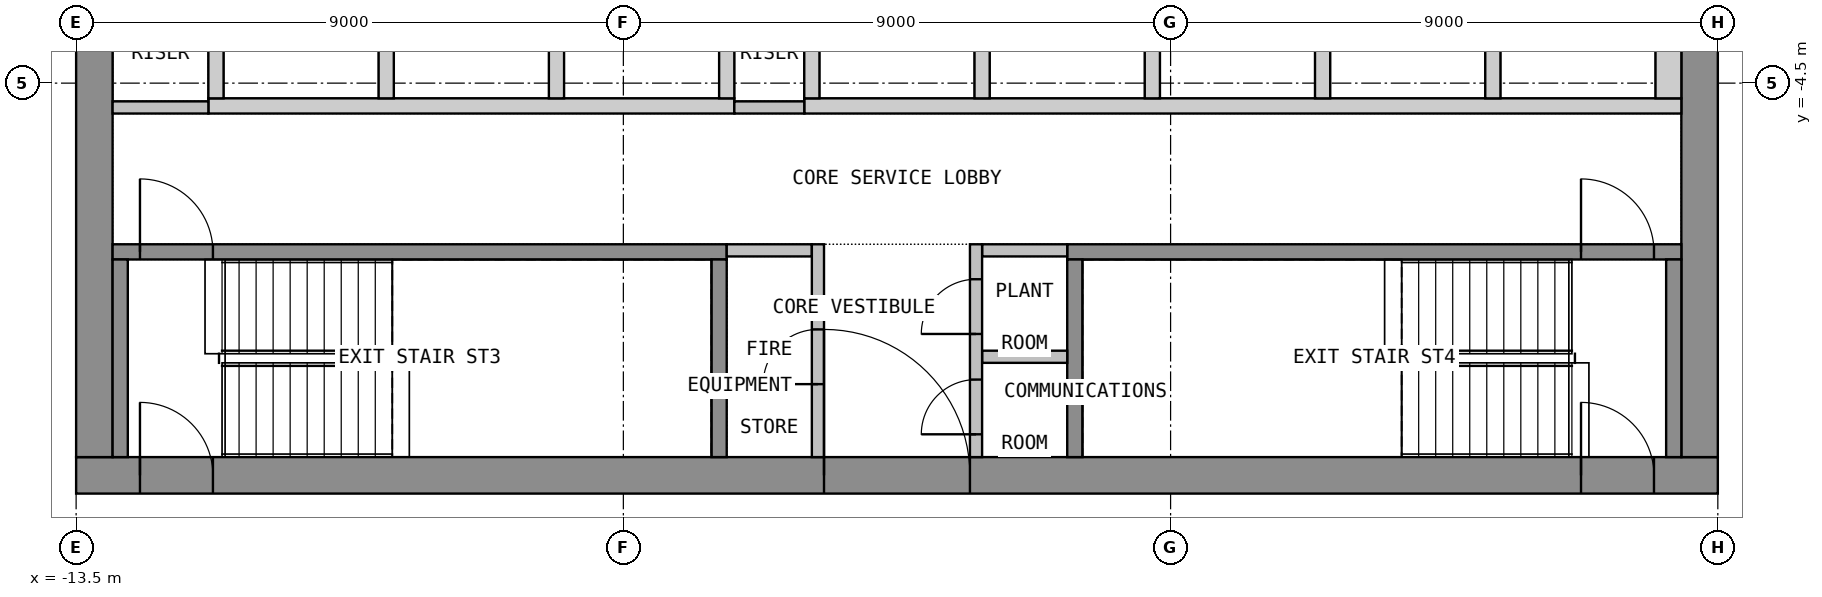
"""IFC4 building model, lengths in metres.
Left out: names, types, materials, properties, quantities, classifications, styles, units other than length and angle.
Written with IfcOpenShell. Run it as: python <this file> out.ifc"""

import sys

from ifc_helpers import new_model, si_unit, direction, frame, frame_2d, origin, place, context, subcontext, project, spatial, polyline, rectangle, outline, extrude, element, fill, save


model = new_model("IFC4")
c1 = context("Model", 3, precision=1e-05, world=origin(), true_north=direction((0.0, 1.0)))
c2 = subcontext(c1, "Body", "Model", "MODEL_VIEW")
j1 = project(units=[si_unit("LENGTHUNIT", "METRE"), si_unit("PLANEANGLEUNIT", "RADIAN")], contexts=[c1])
p1 = place(None, origin())
s1 = spatial("IfcSite", under=j1, at=p1, CompositionType="ELEMENT")
p2 = place(p1, origin())
s2 = spatial("IfcBuilding", under=s1, at=p2, CompositionType="ELEMENT")
p3 = place(p2, frame((0.0, 0.0, 235.2)))
s3 = spatial("IfcBuildingStorey", under=s2, at=p3, CompositionType="ELEMENT", Elevation=235.2)
p4 = place(p3, frame((-13.5, -10.95, 0.0), z_axis=(0.0, 0.0, 1.0), x_axis=(1.0, 0.0, 0.0)))
e1 = element("IfcWall", 1, at=p4, inside=s3, PredefinedType="SHEAR", context=c2, shape_type="SweptSolid", body=[
    extrude(rectangle(XDim=27.0, YDim=0.6, at=frame_2d((13.5, 0.0))), origin(), (0.0, 0.0, 1.0), 3.575),
])
p5 = place(p4, frame((12.3, 0.0, 0.0)))
e2 = element("IfcOpeningElement", 2, at=p5, cuts=e1, PredefinedType="OPENING", context=c2, shape_type="SweptSolid", body=[
    extrude(rectangle(XDim=2.4, YDim=2.1, at=frame_2d((1.2, 1.05))), frame((0.0, 0.31, 0.0), z_axis=(0.0, -1.0, 0.0), x_axis=(1.0, 0.0, 0.0)), (0.0, 0.0, 1.0), 0.62),
])
p6 = place(p4, frame((1.05, 0.0, 0.0)))
e3 = element("IfcOpeningElement", 3, at=p6, cuts=e1, PredefinedType="OPENING", context=c2, shape_type="SweptSolid", body=[
    extrude(rectangle(XDim=1.2, YDim=2.1, at=frame_2d((0.6, 1.05))), frame((0.0, 0.31, 0.0), z_axis=(0.0, -1.0, 0.0), x_axis=(1.0, 0.0, 0.0)), (0.0, 0.0, 1.0), 0.62),
])
p7 = place(p4, frame((24.75, 0.0, 0.0)))
e4 = element("IfcOpeningElement", 4, at=p7, cuts=e1, PredefinedType="OPENING", context=c2, shape_type="SweptSolid", body=[
    extrude(rectangle(XDim=1.2, YDim=2.1, at=frame_2d((0.6, 1.05))), frame((0.0, 0.31, 0.0), z_axis=(0.0, -1.0, 0.0), x_axis=(1.0, 0.0, 0.0)), (0.0, 0.0, 1.0), 0.62),
])
p8 = place(p3, frame((-13.2, -10.65, 0.0), z_axis=(0.0, 0.0, 1.0), x_axis=(0.0, 1.0, 0.0)))
e5 = element("IfcWall", 5, at=p8, inside=s3, PredefinedType="SHEAR", context=c2, shape_type="SweptSolid", body=[
    extrude(rectangle(XDim=21.3, YDim=0.6, at=frame_2d((10.65, 0.0))), origin(), (0.0, 0.0, 1.0), 3.575),
])
p9 = place(p8, frame((9.45, 0.0, 0.0)))
e6 = element("IfcOpeningElement", 6, at=p9, cuts=e5, PredefinedType="OPENING", context=c2, shape_type="SweptSolid", body=[
    extrude(rectangle(XDim=2.4, YDim=2.1, at=frame_2d((1.2, 1.05))), frame((0.0, 0.31, 0.0), z_axis=(0.0, -1.0, 0.0), x_axis=(1.0, 0.0, 0.0)), (0.0, 0.0, 1.0), 0.62),
])
p10 = place(p3, frame((13.2, -10.65, 0.0), z_axis=(0.0, 0.0, 1.0), x_axis=(0.0, 1.0, 0.0)))
e7 = element("IfcWall", 7, at=p10, inside=s3, PredefinedType="SHEAR", context=c2, shape_type="SweptSolid", body=[
    extrude(rectangle(XDim=21.3, YDim=0.6, at=frame_2d((10.65, 0.0))), origin(), (0.0, 0.0, 1.0), 3.575),
])
p11 = place(p10, frame((9.45, 0.0, 0.0)))
e8 = element("IfcOpeningElement", 8, at=p11, cuts=e7, PredefinedType="OPENING", context=c2, shape_type="SweptSolid", body=[
    extrude(rectangle(XDim=2.4, YDim=2.1, at=frame_2d((1.2, 1.05))), frame((0.0, 0.31, 0.0), z_axis=(0.0, -1.0, 0.0), x_axis=(1.0, 0.0, 0.0)), (0.0, 0.0, 1.0), 0.62),
])
p12 = place(p3, origin())
e9 = element("IfcWall", 9, at=p12, inside=s3, PredefinedType="SHEAR", context=c2, shape_type="SweptSolid", body=[
    extrude(outline(polyline([(-11.325, -5.0), (-2.675, -5.0), (-2.675, -4.75), (-11.325, -4.75), (-11.325, -5.0)])), origin(), (0.0, 0.0, 1.0), 3.575),
])
p13 = place(p3, origin())
e10 = element("IfcWall", 10, at=p13, inside=s3, PredefinedType="SHEAR", context=c2, shape_type="SweptSolid", body=[
    extrude(outline(polyline([(-1.525, -5.0), (12.9, -5.0), (12.9, -4.75), (-1.525, -4.75), (-1.525, -5.0)])), origin(), (0.0, 0.0, 1.0), 3.575),
])
p14 = place(p3, origin())
e11 = element("IfcWall", 11, at=p14, inside=s3, PredefinedType="SHEAR", context=c2, shape_type="SweptSolid", body=[
    extrude(outline(polyline([(-11.325, -4.75), (-11.075, -4.75), (-11.075, -2.05), (-11.325, -2.05), (-11.325, -4.75)])), origin(), (0.0, 0.0, 1.0), 3.575),
])
p15 = place(p3, origin())
e12 = element("IfcWall", 12, at=p15, inside=s3, PredefinedType="SHEAR", context=c2, shape_type="SweptSolid", body=[
    extrude(outline(polyline([(-8.525, -4.75), (-8.275, -4.75), (-8.275, -2.05), (-8.525, -2.05), (-8.525, -4.75)])), origin(), (0.0, 0.0, 1.0), 3.575),
])
p16 = place(p3, origin())
e13 = element("IfcWall", 13, at=p16, inside=s3, PredefinedType="SHEAR", context=c2, shape_type="SweptSolid", body=[
    extrude(outline(polyline([(-5.725, -4.75), (-5.475, -4.75), (-5.475, -2.05), (-5.725, -2.05), (-5.725, -4.75)])), origin(), (0.0, 0.0, 1.0), 3.575),
])
p17 = place(p3, origin())
e14 = element("IfcWall", 14, at=p17, inside=s3, PredefinedType="SHEAR", context=c2, shape_type="SweptSolid", body=[
    extrude(outline(polyline([(-2.925, -4.75), (-2.675, -4.75), (-2.675, -2.05), (-2.925, -2.05), (-2.925, -4.75)])), origin(), (0.0, 0.0, 1.0), 3.575),
])
p18 = place(p3, origin())
e15 = element("IfcWall", 15, at=p18, inside=s3, PredefinedType="SHEAR", context=c2, shape_type="SweptSolid", body=[
    extrude(outline(polyline([(-1.525, -4.75), (-1.275, -4.75), (-1.275, -2.05), (-1.525, -2.05), (-1.525, -4.75)])), origin(), (0.0, 0.0, 1.0), 3.575),
])
p19 = place(p3, origin())
e16 = element("IfcWall", 16, at=p19, inside=s3, PredefinedType="SHEAR", context=c2, shape_type="SweptSolid", body=[
    extrude(outline(polyline([(1.275, -4.75), (1.525, -4.75), (1.525, -2.05), (1.275, -2.05), (1.275, -4.75)])), origin(), (0.0, 0.0, 1.0), 3.575),
])
p20 = place(p3, origin())
e17 = element("IfcWall", 17, at=p20, inside=s3, PredefinedType="SHEAR", context=c2, shape_type="SweptSolid", body=[
    extrude(outline(polyline([(4.075, -4.75), (4.325, -4.75), (4.325, -2.05), (4.075, -2.05), (4.075, -4.75)])), origin(), (0.0, 0.0, 1.0), 3.575),
])
p21 = place(p3, origin())
e18 = element("IfcWall", 18, at=p21, inside=s3, PredefinedType="SHEAR", context=c2, shape_type="SweptSolid", body=[
    extrude(outline(polyline([(6.875, -4.75), (7.125, -4.75), (7.125, -2.05), (6.875, -2.05), (6.875, -4.75)])), origin(), (0.0, 0.0, 1.0), 3.575),
])
p22 = place(p3, origin())
e19 = element("IfcWall", 19, at=p22, inside=s3, PredefinedType="SHEAR", context=c2, shape_type="SweptSolid", body=[
    extrude(outline(polyline([(9.675, -4.75), (9.925, -4.75), (9.925, -2.05), (9.675, -2.05), (9.675, -4.75)])), origin(), (0.0, 0.0, 1.0), 3.575),
])
p23 = place(p3, origin())
e20 = element("IfcWall", 20, at=p23, inside=s3, PredefinedType="SHEAR", context=c2, shape_type="SweptSolid", body=[
    extrude(outline(polyline([(12.475, -4.75), (12.9, -4.75), (12.9, -2.05), (12.475, -2.05), (12.475, -4.75)])), origin(), (0.0, 0.0, 1.0), 3.575),
])
p24 = place(p3, frame((-12.9, -7.275, 0.0), z_axis=(0.0, 0.0, 1.0), x_axis=(1.0, 0.0, 0.0)))
e21 = element("IfcWall", 21, at=p24, inside=s3, PredefinedType="SHEAR", context=c2, shape_type="SweptSolid", body=[
    extrude(rectangle(XDim=10.1, YDim=0.25, at=frame_2d((5.05, 0.0))), origin(), (0.0, 0.0, 1.0), 3.575),
])
p25 = place(p24, frame((0.45, 0.0, 0.0)))
e22 = element("IfcOpeningElement", 22, at=p25, cuts=e21, PredefinedType="OPENING", context=c2, shape_type="SweptSolid", body=[
    extrude(rectangle(XDim=1.2, YDim=2.1, at=frame_2d((0.6, 1.05))), frame((0.0, 0.135, 0.0), z_axis=(0.0, -1.0, 0.0), x_axis=(1.0, 0.0, 0.0)), (0.0, 0.0, 1.0), 0.27),
])
for number, where, z_axis, x_axis in (
    (23, (-12.775, -10.65, 0.0), (0.0, 0.0, 1.0), (0.0, 1.0, 0.0)),
    (24, (-2.925, -10.65, 0.0), (0.0, 0.0, 1.0), (0.0, 1.0, 0.0)),
):
    element("IfcWall", number, at=place(p3, frame(where, z_axis=z_axis, x_axis=x_axis)), inside=s3, PredefinedType="SHEAR", context=c2, shape_type="SweptSolid", body=[
        extrude(rectangle(XDim=3.25, YDim=0.25, at=frame_2d((1.625, 0.0))), origin(), (0.0, 0.0, 1.0), 3.575),
    ])
p26 = place(p3, frame((2.8, -7.275, 0.0), z_axis=(0.0, 0.0, 1.0), x_axis=(1.0, 0.0, 0.0)))
e25 = element("IfcWall", 25, at=p26, inside=s3, PredefinedType="SHEAR", context=c2, shape_type="SweptSolid", body=[
    extrude(rectangle(XDim=10.1, YDim=0.25, at=frame_2d((5.05, 0.0))), origin(), (0.0, 0.0, 1.0), 3.575),
])
p27 = place(p26, frame((8.45, 0.0, 0.0)))
e26 = element("IfcOpeningElement", 26, at=p27, cuts=e25, PredefinedType="OPENING", context=c2, shape_type="SweptSolid", body=[
    extrude(rectangle(XDim=1.2, YDim=2.1, at=frame_2d((0.6, 1.05))), frame((0.0, 0.135, 0.0), z_axis=(0.0, -1.0, 0.0), x_axis=(1.0, 0.0, 0.0)), (0.0, 0.0, 1.0), 0.27),
])
for number, where, z_axis, x_axis in (
    (27, (2.925, -10.65, 0.0), (0.0, 0.0, 1.0), (0.0, 1.0, 0.0)),
    (28, (12.775, -10.65, 0.0), (0.0, 0.0, 1.0), (0.0, 1.0, 0.0)),
):
    element("IfcWall", number, at=place(p3, frame(where, z_axis=z_axis, x_axis=x_axis)), inside=s3, PredefinedType="SHEAR", context=c2, shape_type="SweptSolid", body=[
        extrude(rectangle(XDim=3.25, YDim=0.25, at=frame_2d((1.625, 0.0))), origin(), (0.0, 0.0, 1.0), 3.575),
    ])
for number, where, z_axis, x_axis in (
    (29, (-2.8, -7.25, 0.0), (0.0, 0.0, 1.0), (1.0, 0.0, 0.0)),
    (30, (1.4, -7.25, 0.0), (0.0, 0.0, 1.0), (1.0, 0.0, 0.0)),
    (31, (1.4, -9.0, 0.0), (0.0, 0.0, 1.0), (1.0, 0.0, 0.0)),
):
    element("IfcWall", number, at=place(p3, frame(where, z_axis=z_axis, x_axis=x_axis)), inside=s3, PredefinedType="PARTITIONING", context=c2, shape_type="SweptSolid", body=[
        extrude(rectangle(XDim=1.4, YDim=0.2, at=frame_2d((0.7, 0.0))), origin(), (0.0, 0.0, 1.0), 3.575),
    ])
p28 = place(p3, frame((-1.3, -10.65, 0.0), z_axis=(0.0, 0.0, 1.0), x_axis=(0.0, 1.0, 0.0)))
e32 = element("IfcWall", 32, at=p28, inside=s3, PredefinedType="PARTITIONING", context=c2, shape_type="SweptSolid", body=[
    extrude(rectangle(XDim=3.5, YDim=0.2, at=frame_2d((1.75, 0.0))), origin(), (0.0, 0.0, 1.0), 3.575),
])
p29 = place(p28, frame((1.2, 0.0, 0.0)))
e33 = element("IfcOpeningElement", 33, at=p29, cuts=e32, PredefinedType="OPENING", context=c2, shape_type="SweptSolid", body=[
    extrude(rectangle(XDim=0.9, YDim=2.1, at=frame_2d((0.45, 1.05))), frame((0.0, 0.11, 0.0), z_axis=(0.0, -1.0, 0.0), x_axis=(1.0, 0.0, 0.0)), (0.0, 0.0, 1.0), 0.22),
])
p30 = place(p3, frame((1.3, -10.65, 0.0), z_axis=(0.0, 0.0, 1.0), x_axis=(0.0, 1.0, 0.0)))
e34 = element("IfcWall", 34, at=p30, inside=s3, PredefinedType="PARTITIONING", context=c2, shape_type="SweptSolid", body=[
    extrude(rectangle(XDim=3.5, YDim=0.2, at=frame_2d((1.75, 0.0))), origin(), (0.0, 0.0, 1.0), 3.575),
])
p31 = place(p30, frame((0.375, 0.0, 0.0)))
e35 = element("IfcOpeningElement", 35, at=p31, cuts=e34, PredefinedType="OPENING", context=c2, shape_type="SweptSolid", body=[
    extrude(rectangle(XDim=0.9, YDim=2.1, at=frame_2d((0.45, 1.05))), frame((0.0, 0.11, 0.0), z_axis=(0.0, -1.0, 0.0), x_axis=(1.0, 0.0, 0.0)), (0.0, 0.0, 1.0), 0.22),
])
p32 = place(p30, frame((2.025, 0.0, 0.0)))
e36 = element("IfcOpeningElement", 36, at=p32, cuts=e34, PredefinedType="OPENING", context=c2, shape_type="SweptSolid", body=[
    extrude(rectangle(XDim=0.9, YDim=2.1, at=frame_2d((0.45, 1.05))), frame((0.0, 0.11, 0.0), z_axis=(0.0, -1.0, 0.0), x_axis=(1.0, 0.0, 0.0)), (0.0, 0.0, 1.0), 0.22),
])
p33 = place(p3, frame((-12.9, -4.9, 0.0), z_axis=(0.0, 0.0, 1.0), x_axis=(1.0, 0.0, 0.0)))
e37 = element("IfcWall", 37, at=p33, inside=s3, PredefinedType="PARTITIONING", context=c2, shape_type="SweptSolid", body=[
    extrude(rectangle(XDim=1.575, YDim=0.2, at=frame_2d((0.788, 0.0))), origin(), (0.0, 0.0, 1.0), 3.575),
])
p34 = place(p3, frame((-2.675, -4.9, 0.0), z_axis=(0.0, 0.0, 1.0), x_axis=(1.0, 0.0, 0.0)))
e38 = element("IfcWall", 38, at=p34, inside=s3, PredefinedType="PARTITIONING", context=c2, shape_type="SweptSolid", body=[
    extrude(rectangle(XDim=1.15, YDim=0.2, at=frame_2d((0.575, 0.0))), origin(), (0.0, 0.0, 1.0), 3.575),
])
p35 = place(p5, origin())
e39 = element("IfcDoor", 39, at=p35, inside=s3, OperationType="DOUBLE_DOOR_DOUBLE_SWING", PredefinedType="DOOR", context=c2, shape_type="SweptSolid", body=[
    extrude(rectangle(XDim=2.4, YDim=2.1, at=frame_2d((1.2, 1.05))), frame((0.0, 0.025, 0.0), z_axis=(0.0, -1.0, 0.0), x_axis=(1.0, 0.0, 0.0)), (0.0, 0.0, 1.0), 0.05),
])
fill(e2, e39)
p36 = place(p6, origin())
e40 = element("IfcDoor", 40, at=p36, inside=s3, OperationType="SINGLE_SWING_RIGHT", PredefinedType="DOOR", context=c2, shape_type="SweptSolid", body=[
    extrude(rectangle(XDim=1.2, YDim=2.1, at=frame_2d((0.6, 1.05))), frame((0.0, 0.025, 0.0), z_axis=(0.0, -1.0, 0.0), x_axis=(1.0, 0.0, 0.0)), (0.0, 0.0, 1.0), 0.05),
])
fill(e3, e40)
p37 = place(p7, origin())
e41 = element("IfcDoor", 41, at=p37, inside=s3, OperationType="SINGLE_SWING_RIGHT", PredefinedType="DOOR", context=c2, shape_type="SweptSolid", body=[
    extrude(rectangle(XDim=1.2, YDim=2.1, at=frame_2d((0.6, 1.05))), frame((0.0, 0.025, 0.0), z_axis=(0.0, -1.0, 0.0), x_axis=(1.0, 0.0, 0.0)), (0.0, 0.0, 1.0), 0.05),
])
fill(e4, e41)
p38 = place(p25, origin())
e42 = element("IfcDoor", 42, at=p38, inside=s3, OperationType="SINGLE_SWING_LEFT", PredefinedType="DOOR", context=c2, shape_type="SweptSolid", body=[
    extrude(rectangle(XDim=1.2, YDim=2.1, at=frame_2d((0.6, 1.05))), frame((0.0, 0.025, 0.0), z_axis=(0.0, -1.0, 0.0), x_axis=(1.0, 0.0, 0.0)), (0.0, 0.0, 1.0), 0.05),
])
fill(e22, e42)
p39 = place(p27, origin())
e43 = element("IfcDoor", 43, at=p39, inside=s3, OperationType="SINGLE_SWING_LEFT", PredefinedType="DOOR", context=c2, shape_type="SweptSolid", body=[
    extrude(rectangle(XDim=1.2, YDim=2.1, at=frame_2d((0.6, 1.05))), frame((0.0, 0.025, 0.0), z_axis=(0.0, -1.0, 0.0), x_axis=(1.0, 0.0, 0.0)), (0.0, 0.0, 1.0), 0.05),
])
fill(e26, e43)
p40 = place(p29, origin())
e44 = element("IfcDoor", 44, at=p40, inside=s3, OperationType="SINGLE_SWING_LEFT", PredefinedType="DOOR", context=c2, shape_type="SweptSolid", body=[
    extrude(rectangle(XDim=0.9, YDim=2.1, at=frame_2d((0.45, 1.05))), frame((0.0, 0.025, 0.0), z_axis=(0.0, -1.0, 0.0), x_axis=(1.0, 0.0, 0.0)), (0.0, 0.0, 1.0), 0.05),
])
fill(e33, e44)
p41 = place(p31, origin())
e45 = element("IfcDoor", 45, at=p41, inside=s3, OperationType="SINGLE_SWING_LEFT", PredefinedType="DOOR", context=c2, shape_type="SweptSolid", body=[
    extrude(rectangle(XDim=0.9, YDim=2.1, at=frame_2d((0.45, 1.05))), frame((0.0, 0.025, 0.0), z_axis=(0.0, -1.0, 0.0), x_axis=(1.0, 0.0, 0.0)), (0.0, 0.0, 1.0), 0.05),
])
fill(e35, e45)
p42 = place(p32, origin())
e46 = element("IfcDoor", 46, at=p42, inside=s3, OperationType="SINGLE_SWING_LEFT", PredefinedType="DOOR", context=c2, shape_type="SweptSolid", body=[
    extrude(rectangle(XDim=0.9, YDim=2.1, at=frame_2d((0.45, 1.05))), frame((0.0, 0.025, 0.0), z_axis=(0.0, -1.0, 0.0), x_axis=(1.0, 0.0, 0.0)), (0.0, 0.0, 1.0), 0.05),
])
fill(e36, e46)
save(model, sys.argv[1])
